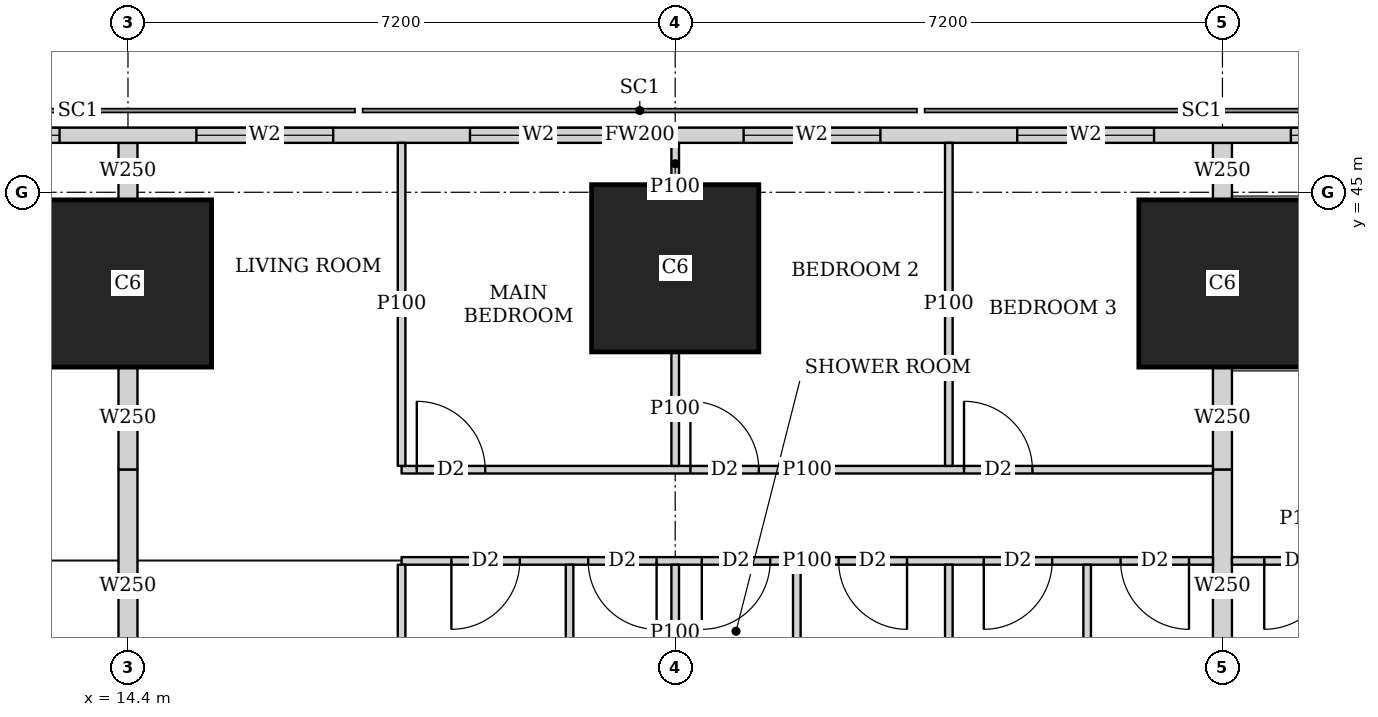
"""IFC4 building model, lengths in metres.
Left out: names, types, materials, properties, quantities, classifications, styles, units other than length and angle.
Written with IfcOpenShell. Run it as: python <this file> out.ifc"""

import sys

from ifc_helpers import new_model, si_unit, direction, frame, frame_2d, origin, origin_2d, place, context, subcontext, project, spatial, rectangle, extrude, element, fill, save


model = new_model("IFC4")
c1 = context("Model", 3, precision=1e-05, world=origin(), true_north=direction((0.0, 1.0)))
c2 = subcontext(c1, "Body", "Model", "MODEL_VIEW")
j1 = project(units=[si_unit("LENGTHUNIT", "METRE"), si_unit("PLANEANGLEUNIT", "RADIAN")], contexts=[c1])
p1 = place(None, origin())
s1 = spatial("IfcSite", under=j1, at=p1, CompositionType="ELEMENT")
p2 = place(p1, origin())
s2 = spatial("IfcBuilding", under=s1, at=p2, CompositionType="ELEMENT")
p3 = place(p2, frame((0.0, 0.0, 81.65)))
s3 = spatial("IfcBuildingStorey", under=s2, at=p3, CompositionType="ELEMENT", Elevation=81.65)
for number, where, z_axis, x_axis in (
    (1, (14.4, 43.8, 0.0), (0.0, 0.0, 1.0), (1.0, 0.0, 0.0)),
    (2, (21.6, 44.0, 0.0), (0.0, 0.0, 1.0), (1.0, 0.0, 0.0)),
    (3, (28.8, 43.8, 0.0), (0.0, 0.0, 1.0), (1.0, 0.0, 0.0)),
):
    element("IfcColumn", number, at=place(p3, frame(where, z_axis=z_axis, x_axis=x_axis)), inside=s3, PredefinedType="COLUMN", context=c2, shape_type="SweptSolid", body=[
        extrude(rectangle(XDim=2.2, YDim=2.2, at=origin_2d()), origin(), (0.0, 0.0, 1.0), 3.75),
    ])
p4 = place(p3, frame((40.106, 45.75, 0.0), z_axis=(0.0, 0.0, 1.0), x_axis=(-1.0, 0.0, 0.0)))
e4 = element("IfcWall", 4, at=p4, inside=s3, PredefinedType="SOLIDWALL", context=c2, shape_type="SweptSolid", body=[
    extrude(rectangle(XDim=37.943, YDim=0.2, at=frame_2d((18.971, 0.0))), origin(), (0.0, 0.0, 1.0), 3.5),
])
p5 = place(p4, frame((8.606, 0.0, 0.9)))
e5 = element("IfcOpeningElement", 5, at=p5, cuts=e4, PredefinedType="OPENING", context=c2, shape_type="SweptSolid", body=[
    extrude(rectangle(XDim=1.8, YDim=1.5, at=frame_2d((0.9, 0.75))), frame((0.0, 0.11, 0.0), z_axis=(0.0, -1.0, 0.0), x_axis=(1.0, 0.0, 0.0)), (0.0, 0.0, 1.0), 0.22),
])
p6 = place(p4, frame((12.206, 0.0, 0.9)))
e6 = element("IfcOpeningElement", 6, at=p6, cuts=e4, PredefinedType="OPENING", context=c2, shape_type="SweptSolid", body=[
    extrude(rectangle(XDim=1.8, YDim=1.5, at=frame_2d((0.9, 0.75))), frame((0.0, 0.11, 0.0), z_axis=(0.0, -1.0, 0.0), x_axis=(1.0, 0.0, 0.0)), (0.0, 0.0, 1.0), 0.22),
])
p7 = place(p4, frame((15.806, 0.0, 0.9)))
e7 = element("IfcOpeningElement", 7, at=p7, cuts=e4, PredefinedType="OPENING", context=c2, shape_type="SweptSolid", body=[
    extrude(rectangle(XDim=1.8, YDim=1.5, at=frame_2d((0.9, 0.75))), frame((0.0, 0.11, 0.0), z_axis=(0.0, -1.0, 0.0), x_axis=(1.0, 0.0, 0.0)), (0.0, 0.0, 1.0), 0.22),
])
p8 = place(p4, frame((19.406, 0.0, 0.9)))
e8 = element("IfcOpeningElement", 8, at=p8, cuts=e4, PredefinedType="OPENING", context=c2, shape_type="SweptSolid", body=[
    extrude(rectangle(XDim=1.8, YDim=1.5, at=frame_2d((0.9, 0.75))), frame((0.0, 0.11, 0.0), z_axis=(0.0, -1.0, 0.0), x_axis=(1.0, 0.0, 0.0)), (0.0, 0.0, 1.0), 0.22),
])
p9 = place(p4, frame((23.006, 0.0, 0.9)))
e9 = element("IfcOpeningElement", 9, at=p9, cuts=e4, PredefinedType="OPENING", context=c2, shape_type="SweptSolid", body=[
    extrude(rectangle(XDim=1.8, YDim=1.5, at=frame_2d((0.9, 0.75))), frame((0.0, 0.11, 0.0), z_axis=(0.0, -1.0, 0.0), x_axis=(1.0, 0.0, 0.0)), (0.0, 0.0, 1.0), 0.22),
])
p10 = place(p4, frame((26.606, 0.0, 0.9)))
e10 = element("IfcOpeningElement", 10, at=p10, cuts=e4, PredefinedType="OPENING", context=c2, shape_type="SweptSolid", body=[
    extrude(rectangle(XDim=1.8, YDim=1.5, at=frame_2d((0.9, 0.75))), frame((0.0, 0.11, 0.0), z_axis=(0.0, -1.0, 0.0), x_axis=(1.0, 0.0, 0.0)), (0.0, 0.0, 1.0), 0.22),
])
p11 = place(p3, frame((18.0, 41.35, 0.0), z_axis=(0.0, 0.0, 1.0), x_axis=(1.0, 0.0, 0.0)))
e11 = element("IfcWall", 11, at=p11, inside=s3, PredefinedType="PARTITIONING", context=c2, shape_type="SweptSolid", body=[
    extrude(rectangle(XDim=10.675, YDim=0.1, at=frame_2d((5.337, 0.0))), origin(), (0.0, 0.0, 1.0), 3.5),
])
p12 = place(p11, frame((0.2, 0.0, 0.0)))
e12 = element("IfcOpeningElement", 12, at=p12, cuts=e11, PredefinedType="OPENING", context=c2, shape_type="SweptSolid", body=[
    extrude(rectangle(XDim=0.9, YDim=2.1, at=frame_2d((0.45, 1.05))), frame((0.0, 0.06, 0.0), z_axis=(0.0, -1.0, 0.0), x_axis=(1.0, 0.0, 0.0)), (0.0, 0.0, 1.0), 0.12),
])
p13 = place(p11, frame((3.8, 0.0, 0.0)))
e13 = element("IfcOpeningElement", 13, at=p13, cuts=e11, PredefinedType="OPENING", context=c2, shape_type="SweptSolid", body=[
    extrude(rectangle(XDim=0.9, YDim=2.1, at=frame_2d((0.45, 1.05))), frame((0.0, 0.06, 0.0), z_axis=(0.0, -1.0, 0.0), x_axis=(1.0, 0.0, 0.0)), (0.0, 0.0, 1.0), 0.12),
])
p14 = place(p11, frame((7.4, 0.0, 0.0)))
e14 = element("IfcOpeningElement", 14, at=p14, cuts=e11, PredefinedType="OPENING", context=c2, shape_type="SweptSolid", body=[
    extrude(rectangle(XDim=0.9, YDim=2.1, at=frame_2d((0.45, 1.05))), frame((0.0, 0.06, 0.0), z_axis=(0.0, -1.0, 0.0), x_axis=(1.0, 0.0, 0.0)), (0.0, 0.0, 1.0), 0.12),
])
p15 = place(p3, frame((18.0, 40.15, 0.0), z_axis=(0.0, 0.0, 1.0), x_axis=(1.0, 0.0, 0.0)))
e15 = element("IfcWall", 15, at=p15, inside=s3, PredefinedType="PARTITIONING", context=c2, shape_type="SweptSolid", body=[
    extrude(rectangle(XDim=10.675, YDim=0.1, at=frame_2d((5.337, 0.0))), origin(), (0.0, 0.0, 1.0), 3.5),
])
p16 = place(p15, frame((0.655, 0.0, 0.0)))
e16 = element("IfcOpeningElement", 16, at=p16, cuts=e15, PredefinedType="OPENING", context=c2, shape_type="SweptSolid", body=[
    extrude(rectangle(XDim=0.9, YDim=2.1, at=frame_2d((0.45, 1.05))), frame((0.0, 0.06, 0.0), z_axis=(0.0, -1.0, 0.0), x_axis=(1.0, 0.0, 0.0)), (0.0, 0.0, 1.0), 0.12),
])
p17 = place(p15, frame((3.95, 0.0, 0.0)))
e17 = element("IfcOpeningElement", 17, at=p17, cuts=e15, PredefinedType="OPENING", context=c2, shape_type="SweptSolid", body=[
    extrude(rectangle(XDim=0.9, YDim=2.1, at=frame_2d((0.45, 1.05))), frame((0.0, 0.06, 0.0), z_axis=(0.0, -1.0, 0.0), x_axis=(1.0, 0.0, 0.0)), (0.0, 0.0, 1.0), 0.12),
])
p18 = place(p15, frame((7.66, 0.0, 0.0)))
e18 = element("IfcOpeningElement", 18, at=p18, cuts=e15, PredefinedType="OPENING", context=c2, shape_type="SweptSolid", body=[
    extrude(rectangle(XDim=0.9, YDim=2.1, at=frame_2d((0.45, 1.05))), frame((0.0, 0.06, 0.0), z_axis=(0.0, -1.0, 0.0), x_axis=(1.0, 0.0, 0.0)), (0.0, 0.0, 1.0), 0.12),
])
p19 = place(p15, frame((2.455, 0.0, 0.0)))
e19 = element("IfcOpeningElement", 19, at=p19, cuts=e15, PredefinedType="OPENING", context=c2, shape_type="SweptSolid", body=[
    extrude(rectangle(XDim=0.9, YDim=2.1, at=frame_2d((0.45, 1.05))), frame((0.0, 0.06, 0.0), z_axis=(0.0, -1.0, 0.0), x_axis=(1.0, 0.0, 0.0)), (0.0, 0.0, 1.0), 0.12),
])
p20 = place(p15, frame((5.75, 0.0, 0.0)))
e20 = element("IfcOpeningElement", 20, at=p20, cuts=e15, PredefinedType="OPENING", context=c2, shape_type="SweptSolid", body=[
    extrude(rectangle(XDim=0.9, YDim=2.1, at=frame_2d((0.45, 1.05))), frame((0.0, 0.06, 0.0), z_axis=(0.0, -1.0, 0.0), x_axis=(1.0, 0.0, 0.0)), (0.0, 0.0, 1.0), 0.12),
])
p21 = place(p15, frame((9.46, 0.0, 0.0)))
e21 = element("IfcOpeningElement", 21, at=p21, cuts=e15, PredefinedType="OPENING", context=c2, shape_type="SweptSolid", body=[
    extrude(rectangle(XDim=0.9, YDim=2.1, at=frame_2d((0.45, 1.05))), frame((0.0, 0.06, 0.0), z_axis=(0.0, -1.0, 0.0), x_axis=(1.0, 0.0, 0.0)), (0.0, 0.0, 1.0), 0.12),
])
p22 = place(p3, frame((18.0, 41.4, 0.0), z_axis=(0.0, 0.0, 1.0), x_axis=(0.0, 1.0, 0.0)))
e22 = element("IfcWall", 22, at=p22, inside=s3, PredefinedType="PARTITIONING", context=c2, shape_type="SweptSolid", body=[
    extrude(rectangle(XDim=4.25, YDim=0.1, at=frame_2d((2.125, 0.0))), origin(), (0.0, 0.0, 1.0), 2.2),
])
p23 = place(p3, frame((21.6, 41.4, 0.0), z_axis=(0.0, 0.0, 1.0), x_axis=(0.0, 1.0, 0.0)))
e23 = element("IfcWall", 23, at=p23, inside=s3, PredefinedType="PARTITIONING", context=c2, shape_type="SweptSolid", body=[
    extrude(rectangle(XDim=1.499, YDim=0.1, at=frame_2d((0.75, 0.0))), origin(), (0.0, 0.0, 1.0), 3.5),
])
p24 = place(p3, frame((21.6, 45.101, 0.0), z_axis=(0.0, 0.0, 1.0), x_axis=(0.0, 1.0, 0.0)))
e24 = element("IfcWall", 24, at=p24, inside=s3, PredefinedType="PARTITIONING", context=c2, shape_type="SweptSolid", body=[
    extrude(rectangle(XDim=0.549, YDim=0.1, at=frame_2d((0.274, 0.0))), origin(), (0.0, 0.0, 1.0), 3.5),
])
p25 = place(p3, frame((25.2, 41.4, 0.0), z_axis=(0.0, 0.0, 1.0), x_axis=(0.0, 1.0, 0.0)))
e25 = element("IfcWall", 25, at=p25, inside=s3, PredefinedType="PARTITIONING", context=c2, shape_type="SweptSolid", body=[
    extrude(rectangle(XDim=4.25, YDim=0.1, at=frame_2d((2.125, 0.0))), origin(), (0.0, 0.0, 1.0), 2.2),
])
p26 = place(p3, frame((18.0, 36.825, 0.0), z_axis=(0.0, 0.0, 1.0), x_axis=(0.0, 1.0, 0.0)))
e26 = element("IfcWall", 26, at=p26, inside=s3, PredefinedType="PARTITIONING", context=c2, shape_type="SweptSolid", body=[
    extrude(rectangle(XDim=3.275, YDim=0.1, at=frame_2d((1.638, 0.0))), origin(), (0.0, 0.0, 1.0), 3.5),
])
p27 = place(p3, frame((21.6, 38.301, 0.0), z_axis=(0.0, 0.0, 1.0), x_axis=(0.0, 1.0, 0.0)))
e27 = element("IfcWall", 27, at=p27, inside=s3, PredefinedType="PARTITIONING", context=c2, shape_type="SweptSolid", body=[
    extrude(rectangle(XDim=1.799, YDim=0.1, at=frame_2d((0.899, 0.0))), origin(), (0.0, 0.0, 1.0), 3.5),
])
for number, where, z_axis, x_axis in (
    (28, (25.2, 36.825, 0.0), (0.0, 0.0, 1.0), (0.0, 1.0, 0.0)),
    (29, (20.21, 36.825, 0.0), (0.0, 0.0, 1.0), (0.0, 1.0, 0.0)),
    (30, (23.2, 36.825, 0.0), (0.0, 0.0, 1.0), (0.0, 1.0, 0.0)),
    (31, (27.02, 36.825, 0.0), (0.0, 0.0, 1.0), (0.0, 1.0, 0.0)),
):
    element("IfcWall", number, at=place(p3, frame(where, z_axis=z_axis, x_axis=x_axis)), inside=s3, PredefinedType="PARTITIONING", context=c2, shape_type="SweptSolid", body=[
        extrude(rectangle(XDim=3.275, YDim=0.1, at=frame_2d((1.638, 0.0))), origin(), (0.0, 0.0, 1.0), 3.5),
    ])
p28 = place(p3, frame((14.4, 41.35, 0.0), z_axis=(0.0, 0.0, 1.0), x_axis=(0.0, 1.0, 0.0)))
e32 = element("IfcWall", 32, at=p28, inside=s3, PredefinedType="SOLIDWALL", context=c2, shape_type="SweptSolid", body=[
    extrude(rectangle(XDim=1.349, YDim=0.25, at=frame_2d((0.674, 0.0))), origin(), (0.0, 0.0, 1.0), 3.5),
])
p29 = place(p3, frame((14.4, 44.901, 0.0), z_axis=(0.0, 0.0, 1.0), x_axis=(0.0, 1.0, 0.0)))
e33 = element("IfcWall", 33, at=p29, inside=s3, PredefinedType="SOLIDWALL", context=c2, shape_type="SweptSolid", body=[
    extrude(rectangle(XDim=0.749, YDim=0.25, at=frame_2d((0.375, 0.0))), origin(), (0.0, 0.0, 1.0), 3.5),
])
p30 = place(p3, frame((14.4, 38.301, 0.0), z_axis=(0.0, 0.0, 1.0), x_axis=(0.0, 1.0, 0.0)))
e34 = element("IfcWall", 34, at=p30, inside=s3, PredefinedType="SOLIDWALL", context=c2, shape_type="SweptSolid", body=[
    extrude(rectangle(XDim=3.049, YDim=0.25, at=frame_2d((1.524, 0.0))), origin(), (0.0, 0.0, 1.0), 3.5),
])
p31 = place(p3, frame((28.925, 40.15, 0.0), z_axis=(0.0, 0.0, 1.0), x_axis=(1.0, 0.0, 0.0)))
e35 = element("IfcWall", 35, at=p31, inside=s3, PredefinedType="PARTITIONING", context=c2, shape_type="SweptSolid", body=[
    extrude(rectangle(XDim=1.904, YDim=0.1, at=frame_2d((0.952, 0.0))), origin(), (0.0, 0.0, 1.0), 3.5),
])
p32 = place(p31, frame((0.425, 0.0, 0.0)))
e36 = element("IfcOpeningElement", 36, at=p32, cuts=e35, PredefinedType="OPENING", context=c2, shape_type="SweptSolid", body=[
    extrude(rectangle(XDim=0.9, YDim=2.1, at=frame_2d((0.45, 1.05))), frame((0.0, 0.06, 0.0), z_axis=(0.0, -1.0, 0.0), x_axis=(1.0, 0.0, 0.0)), (0.0, 0.0, 1.0), 0.12),
])
p33 = place(p3, frame((28.8, 41.35, 0.0), z_axis=(0.0, 0.0, 1.0), x_axis=(0.0, 1.0, 0.0)))
e37 = element("IfcWall", 37, at=p33, inside=s3, PredefinedType="SOLIDWALL", context=c2, shape_type="SweptSolid", body=[
    extrude(rectangle(XDim=1.349, YDim=0.25, at=frame_2d((0.674, 0.0))), origin(), (0.0, 0.0, 1.0), 3.5),
])
p34 = place(p3, frame((28.8, 44.901, 0.0), z_axis=(0.0, 0.0, 1.0), x_axis=(0.0, 1.0, 0.0)))
e38 = element("IfcWall", 38, at=p34, inside=s3, PredefinedType="SOLIDWALL", context=c2, shape_type="SweptSolid", body=[
    extrude(rectangle(XDim=0.749, YDim=0.25, at=frame_2d((0.375, 0.0))), origin(), (0.0, 0.0, 1.0), 3.5),
])
p35 = place(p3, frame((28.8, 38.301, 0.0), z_axis=(0.0, 0.0, 1.0), x_axis=(0.0, 1.0, 0.0)))
e39 = element("IfcWall", 39, at=p35, inside=s3, PredefinedType="SOLIDWALL", context=c2, shape_type="SweptSolid", body=[
    extrude(rectangle(XDim=3.049, YDim=0.25, at=frame_2d((1.524, 0.0))), origin(), (0.0, 0.0, 1.0), 3.5),
])
p36 = place(p5, origin())
e40 = element("IfcWindow", 40, at=p36, inside=s3, PartitioningType="SINGLE_PANEL", PredefinedType="WINDOW", context=c2, shape_type="SweptSolid", body=[
    extrude(rectangle(XDim=1.8, YDim=1.5, at=frame_2d((0.9, 0.75))), frame((0.0, 0.03, 0.0), z_axis=(0.0, -1.0, 0.0), x_axis=(1.0, 0.0, 0.0)), (0.0, 0.0, 1.0), 0.06),
])
fill(e5, e40)
p37 = place(p6, origin())
e41 = element("IfcWindow", 41, at=p37, inside=s3, PartitioningType="SINGLE_PANEL", PredefinedType="WINDOW", context=c2, shape_type="SweptSolid", body=[
    extrude(rectangle(XDim=1.8, YDim=1.5, at=frame_2d((0.9, 0.75))), frame((0.0, 0.03, 0.0), z_axis=(0.0, -1.0, 0.0), x_axis=(1.0, 0.0, 0.0)), (0.0, 0.0, 1.0), 0.06),
])
fill(e6, e41)
p38 = place(p7, origin())
e42 = element("IfcWindow", 42, at=p38, inside=s3, PartitioningType="SINGLE_PANEL", PredefinedType="WINDOW", context=c2, shape_type="SweptSolid", body=[
    extrude(rectangle(XDim=1.8, YDim=1.5, at=frame_2d((0.9, 0.75))), frame((0.0, 0.03, 0.0), z_axis=(0.0, -1.0, 0.0), x_axis=(1.0, 0.0, 0.0)), (0.0, 0.0, 1.0), 0.06),
])
fill(e7, e42)
p39 = place(p8, origin())
e43 = element("IfcWindow", 43, at=p39, inside=s3, PartitioningType="SINGLE_PANEL", PredefinedType="WINDOW", context=c2, shape_type="SweptSolid", body=[
    extrude(rectangle(XDim=1.8, YDim=1.5, at=frame_2d((0.9, 0.75))), frame((0.0, 0.03, 0.0), z_axis=(0.0, -1.0, 0.0), x_axis=(1.0, 0.0, 0.0)), (0.0, 0.0, 1.0), 0.06),
])
fill(e8, e43)
p40 = place(p9, origin())
e44 = element("IfcWindow", 44, at=p40, inside=s3, PartitioningType="SINGLE_PANEL", PredefinedType="WINDOW", context=c2, shape_type="SweptSolid", body=[
    extrude(rectangle(XDim=1.8, YDim=1.5, at=frame_2d((0.9, 0.75))), frame((0.0, 0.03, 0.0), z_axis=(0.0, -1.0, 0.0), x_axis=(1.0, 0.0, 0.0)), (0.0, 0.0, 1.0), 0.06),
])
fill(e9, e44)
p41 = place(p10, origin())
e45 = element("IfcWindow", 45, at=p41, inside=s3, PartitioningType="SINGLE_PANEL", PredefinedType="WINDOW", context=c2, shape_type="SweptSolid", body=[
    extrude(rectangle(XDim=1.8, YDim=1.5, at=frame_2d((0.9, 0.75))), frame((0.0, 0.03, 0.0), z_axis=(0.0, -1.0, 0.0), x_axis=(1.0, 0.0, 0.0)), (0.0, 0.0, 1.0), 0.06),
])
fill(e10, e45)
p42 = place(p12, origin())
e46 = element("IfcDoor", 46, at=p42, inside=s3, OperationType="SINGLE_SWING_LEFT", PredefinedType="DOOR", context=c2, shape_type="SweptSolid", body=[
    extrude(rectangle(XDim=0.9, YDim=2.1, at=frame_2d((0.45, 1.05))), frame((0.0, 0.025, 0.0), z_axis=(0.0, -1.0, 0.0), x_axis=(1.0, 0.0, 0.0)), (0.0, 0.0, 1.0), 0.05),
])
fill(e12, e46)
p43 = place(p13, origin())
e47 = element("IfcDoor", 47, at=p43, inside=s3, OperationType="SINGLE_SWING_LEFT", PredefinedType="DOOR", context=c2, shape_type="SweptSolid", body=[
    extrude(rectangle(XDim=0.9, YDim=2.1, at=frame_2d((0.45, 1.05))), frame((0.0, 0.025, 0.0), z_axis=(0.0, -1.0, 0.0), x_axis=(1.0, 0.0, 0.0)), (0.0, 0.0, 1.0), 0.05),
])
fill(e13, e47)
p44 = place(p14, origin())
e48 = element("IfcDoor", 48, at=p44, inside=s3, OperationType="SINGLE_SWING_LEFT", PredefinedType="DOOR", context=c2, shape_type="SweptSolid", body=[
    extrude(rectangle(XDim=0.9, YDim=2.1, at=frame_2d((0.45, 1.05))), frame((0.0, 0.025, 0.0), z_axis=(0.0, -1.0, 0.0), x_axis=(1.0, 0.0, 0.0)), (0.0, 0.0, 1.0), 0.05),
])
fill(e14, e48)
p45 = place(p16, origin())
e49 = element("IfcDoor", 49, at=p45, inside=s3, OperationType="SINGLE_SWING_RIGHT", PredefinedType="DOOR", context=c2, shape_type="SweptSolid", body=[
    extrude(rectangle(XDim=0.9, YDim=2.1, at=frame_2d((0.45, 1.05))), frame((0.0, 0.025, 0.0), z_axis=(0.0, -1.0, 0.0), x_axis=(1.0, 0.0, 0.0)), (0.0, 0.0, 1.0), 0.05),
])
fill(e16, e49)
p46 = place(p17, origin())
e50 = element("IfcDoor", 50, at=p46, inside=s3, OperationType="SINGLE_SWING_RIGHT", PredefinedType="DOOR", context=c2, shape_type="SweptSolid", body=[
    extrude(rectangle(XDim=0.9, YDim=2.1, at=frame_2d((0.45, 1.05))), frame((0.0, 0.025, 0.0), z_axis=(0.0, -1.0, 0.0), x_axis=(1.0, 0.0, 0.0)), (0.0, 0.0, 1.0), 0.05),
])
fill(e17, e50)
p47 = place(p18, origin())
e51 = element("IfcDoor", 51, at=p47, inside=s3, OperationType="SINGLE_SWING_RIGHT", PredefinedType="DOOR", context=c2, shape_type="SweptSolid", body=[
    extrude(rectangle(XDim=0.9, YDim=2.1, at=frame_2d((0.45, 1.05))), frame((0.0, 0.025, 0.0), z_axis=(0.0, -1.0, 0.0), x_axis=(1.0, 0.0, 0.0)), (0.0, 0.0, 1.0), 0.05),
])
fill(e18, e51)
p48 = place(p19, origin())
e52 = element("IfcDoor", 52, at=p48, inside=s3, OperationType="SINGLE_SWING_LEFT", PredefinedType="DOOR", context=c2, shape_type="SweptSolid", body=[
    extrude(rectangle(XDim=0.9, YDim=2.1, at=frame_2d((0.45, 1.05))), frame((0.0, 0.025, 0.0), z_axis=(0.0, -1.0, 0.0), x_axis=(1.0, 0.0, 0.0)), (0.0, 0.0, 1.0), 0.05),
])
fill(e19, e52)
p49 = place(p20, origin())
e53 = element("IfcDoor", 53, at=p49, inside=s3, OperationType="SINGLE_SWING_LEFT", PredefinedType="DOOR", context=c2, shape_type="SweptSolid", body=[
    extrude(rectangle(XDim=0.9, YDim=2.1, at=frame_2d((0.45, 1.05))), frame((0.0, 0.025, 0.0), z_axis=(0.0, -1.0, 0.0), x_axis=(1.0, 0.0, 0.0)), (0.0, 0.0, 1.0), 0.05),
])
fill(e20, e53)
p50 = place(p21, origin())
e54 = element("IfcDoor", 54, at=p50, inside=s3, OperationType="SINGLE_SWING_LEFT", PredefinedType="DOOR", context=c2, shape_type="SweptSolid", body=[
    extrude(rectangle(XDim=0.9, YDim=2.1, at=frame_2d((0.45, 1.05))), frame((0.0, 0.025, 0.0), z_axis=(0.0, -1.0, 0.0), x_axis=(1.0, 0.0, 0.0)), (0.0, 0.0, 1.0), 0.05),
])
fill(e21, e54)
p51 = place(p32, origin())
e55 = element("IfcDoor", 55, at=p51, inside=s3, OperationType="SINGLE_SWING_RIGHT", PredefinedType="DOOR", context=c2, shape_type="SweptSolid", body=[
    extrude(rectangle(XDim=0.9, YDim=2.1, at=frame_2d((0.45, 1.05))), frame((0.0, 0.025, 0.0), z_axis=(0.0, -1.0, 0.0), x_axis=(1.0, 0.0, 0.0)), (0.0, 0.0, 1.0), 0.05),
])
fill(e36, e55)
save(model, sys.argv[1])
